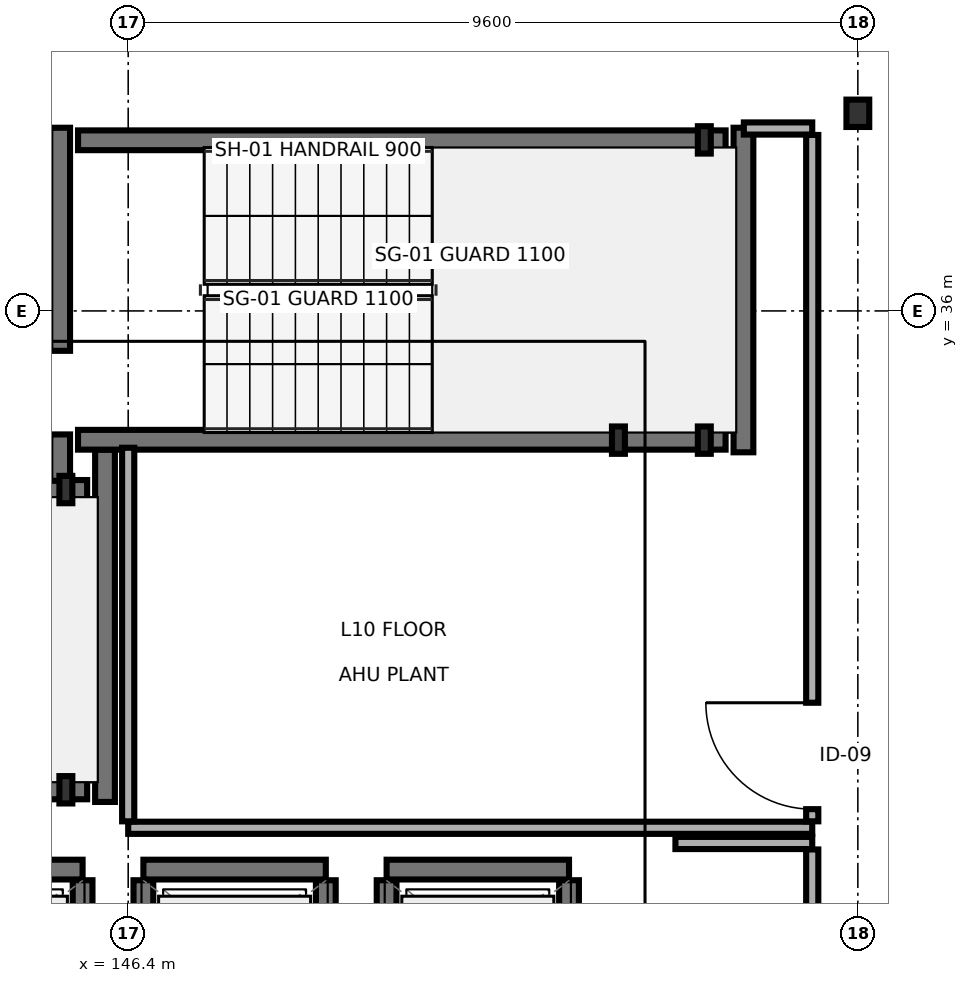
"""IFC4 building model, lengths in metres.
Left out: names, types, materials, properties, quantities, classifications, styles, units other than length and angle.
Written with IfcOpenShell. Run it as: python <this file> out.ifc"""

import sys

from ifc_helpers import new_model, si_unit, direction, frame, frame_2d, origin, origin_2d, place, context, subcontext, project, spatial, rectangle, i_section, extrude, element, fill, save


model = new_model("IFC4")
c1 = context("Model", 3, precision=1e-05, world=origin(), true_north=direction((0.0, 1.0)))
c2 = subcontext(c1, "Body", "Model", "MODEL_VIEW")
j1 = project(units=[si_unit("LENGTHUNIT", "METRE"), si_unit("PLANEANGLEUNIT", "RADIAN")], contexts=[c1])
p1 = place(None, origin())
s1 = spatial("IfcSite", under=j1, at=p1, CompositionType="ELEMENT")
p2 = place(p1, origin())
s2 = spatial("IfcBuilding", under=s1, at=p2, CompositionType="ELEMENT")
p3 = place(p2, frame((0.0, 0.0, 35.1)))
s3 = spatial("IfcBuildingStorey", under=s2, at=p3, CompositionType="ELEMENT", Elevation=35.1)
for number, where, z_axis, x_axis in (
    (1, (145.58, 29.7, 0.0), (0.0, 0.0, 1.0), (1.0, 0.0, 0.0)),
    (2, (145.58, 33.65, 0.0), (0.0, 0.0, 1.0), (1.0, 0.0, 0.0)),
    (3, (152.85, 34.3, 0.0), (0.0, 0.0, 1.0), (1.0, 0.0, 0.0)),
    (4, (153.98, 34.3, 0.0), (0.0, 0.0, 1.0), (1.0, 0.0, 0.0)),
    (5, (153.98, 38.25, 0.0), (0.0, 0.0, 1.0), (1.0, 0.0, 0.0)),
):
    element("IfcColumn", number, at=place(p3, frame(where, z_axis=z_axis, x_axis=x_axis)), inside=s3, PredefinedType="PILASTER", context=c2, shape_type="SweptSolid", body=[
        extrude(i_section(OverallWidth=0.17, OverallDepth=0.36, WebThickness=0.008, FlangeThickness=0.013, FilletRadius=0.018, at=origin_2d()), origin(), (0.0, 0.0, 1.0), 3.4),
    ])
p4 = place(p3, frame((156.0, 38.6, 0.0), z_axis=(0.0, 0.0, 1.0), x_axis=(1.0, 0.0, 0.0)))
e6 = element("IfcColumn", 6, at=p4, inside=s3, PredefinedType="COLUMN", context=c2, shape_type="SweptSolid", body=[
    extrude(i_section(OverallWidth=0.3, OverallDepth=0.36, WebThickness=0.012, FlangeThickness=0.022, FilletRadius=0.027, at=origin_2d()), origin(), (0.0, 0.0, 1.0), 3.4),
])
p5 = place(p3, frame((146.095, 29.54, 0.0), z_axis=(0.0, 0.0, 1.0), x_axis=(0.0, 1.0, 0.0)))
e7 = element("IfcWall", 7, at=p5, inside=s3, PredefinedType="SHEAR", context=c2, shape_type="SweptSolid", body=[
    extrude(rectangle(XDim=4.635, YDim=0.26, at=frame_2d((2.317, 0.0))), origin(), (0.0, 0.0, 1.0), 3.165),
])
for number, where, z_axis, x_axis in (
    (8, (137.34, 29.705, 0.0), (0.0, 0.0, 1.0), (1.0, 0.0, 0.0)),
    (9, (137.34, 33.645, 0.0), (0.0, 0.0, 1.0), (1.0, 0.0, 0.0)),
):
    element("IfcWall", number, at=place(p3, frame(where, z_axis=z_axis, x_axis=x_axis)), inside=s3, PredefinedType="SHEAR", context=c2, shape_type="SweptSolid", body=[
        extrude(rectangle(XDim=8.52, YDim=0.26, at=frame_2d((4.26, 0.0))), origin(), (0.0, 0.0, 1.0), 3.165),
    ])
p6 = place(p3, frame((145.505, 33.765, 0.0), z_axis=(0.0, 0.0, 1.0), x_axis=(0.0, 1.0, 0.0)))
e10 = element("IfcWall", 10, at=p6, inside=s3, PredefinedType="SHEAR", context=c2, shape_type="SweptSolid", body=[
    extrude(rectangle(XDim=4.645, YDim=0.26, at=frame_2d((2.323, 0.0))), origin(), (0.0, 0.0, 1.0), 3.165),
])
p7 = place(p6, frame((0.61, 0.0, 0.0)))
e11 = element("IfcOpeningElement", 11, at=p7, cuts=e10, PredefinedType="OPENING", context=c2, shape_type="SweptSolid", body=[
    extrude(rectangle(XDim=1.1, YDim=2.2, at=frame_2d((0.55, 1.1))), frame((0.0, 0.14, 0.0), z_axis=(0.0, -1.0, 0.0), x_axis=(1.0, 0.0, 0.0)), (0.0, 0.0, 1.0), 0.28),
])
p8 = place(p3, frame((154.495, 34.14, 0.0), z_axis=(0.0, 0.0, 1.0), x_axis=(0.0, 1.0, 0.0)))
e12 = element("IfcWall", 12, at=p8, inside=s3, PredefinedType="SHEAR", context=c2, shape_type="SweptSolid", body=[
    extrude(rectangle(XDim=4.27, YDim=0.26, at=frame_2d((2.135, 0.0))), origin(), (0.0, 0.0, 1.0), 3.165),
])
for number, where, z_axis, x_axis in (
    (13, (145.74, 34.305, 0.0), (0.0, 0.0, 1.0), (1.0, 0.0, 0.0)),
    (14, (145.74, 38.245, 0.0), (0.0, 0.0, 1.0), (1.0, 0.0, 0.0)),
):
    element("IfcWall", number, at=place(p3, frame(where, z_axis=z_axis, x_axis=x_axis)), inside=s3, PredefinedType="SHEAR", context=c2, shape_type="SweptSolid", body=[
        extrude(rectangle(XDim=8.52, YDim=0.26, at=frame_2d((4.26, 0.0))), origin(), (0.0, 0.0, 1.0), 3.165),
    ])
p9 = place(p3, frame((143.4, 28.65, 0.0), z_axis=(0.0, 0.0, 1.0), x_axis=(1.0, 0.0, 0.0)))
e15 = element("IfcWall", 15, at=p9, inside=s3, PredefinedType="SHEAR", context=c2, shape_type="SweptSolid", body=[
    extrude(rectangle(XDim=2.4, YDim=0.26, at=frame_2d((1.2, 0.0))), origin(), (0.0, 0.0, 1.0), 3.165),
])
p10 = place(p3, frame((145.8, 26.69, 0.0), z_axis=(0.0, 0.0, 1.0), x_axis=(0.0, 1.0, 0.0)))
e16 = element("IfcWall", 16, at=p10, inside=s3, PredefinedType="SHEAR", context=c2, shape_type="SweptSolid", body=[
    extrude(rectangle(XDim=1.82, YDim=0.26, at=frame_2d((0.91, 0.0))), origin(), (0.0, 0.0, 1.0), 3.165),
])
p11 = place(p3, frame((146.6, 28.65, 0.0), z_axis=(0.0, 0.0, 1.0), x_axis=(1.0, 0.0, 0.0)))
e17 = element("IfcWall", 17, at=p11, inside=s3, PredefinedType="SHEAR", context=c2, shape_type="SweptSolid", body=[
    extrude(rectangle(XDim=2.4, YDim=0.26, at=frame_2d((1.2, 0.0))), origin(), (0.0, 0.0, 1.0), 3.165),
])
for number, where, z_axis, x_axis in (
    (18, (146.6, 26.69, 0.0), (0.0, 0.0, 1.0), (0.0, 1.0, 0.0)),
    (19, (149.0, 26.69, 0.0), (0.0, 0.0, 1.0), (0.0, 1.0, 0.0)),
):
    element("IfcWall", number, at=place(p3, frame(where, z_axis=z_axis, x_axis=x_axis)), inside=s3, PredefinedType="SHEAR", context=c2, shape_type="SweptSolid", body=[
        extrude(rectangle(XDim=1.82, YDim=0.26, at=frame_2d((0.91, 0.0))), origin(), (0.0, 0.0, 1.0), 3.165),
    ])
p12 = place(p3, frame((149.8, 28.65, 0.0), z_axis=(0.0, 0.0, 1.0), x_axis=(1.0, 0.0, 0.0)))
e20 = element("IfcWall", 20, at=p12, inside=s3, PredefinedType="SHEAR", context=c2, shape_type="SweptSolid", body=[
    extrude(rectangle(XDim=2.4, YDim=0.26, at=frame_2d((1.2, 0.0))), origin(), (0.0, 0.0, 1.0), 3.165),
])
for number, where, z_axis, x_axis in (
    (21, (149.8, 26.69, 0.0), (0.0, 0.0, 1.0), (0.0, 1.0, 0.0)),
    (22, (152.2, 26.69, 0.0), (0.0, 0.0, 1.0), (0.0, 1.0, 0.0)),
):
    element("IfcWall", number, at=place(p3, frame(where, z_axis=z_axis, x_axis=x_axis)), inside=s3, PredefinedType="SHEAR", context=c2, shape_type="SweptSolid", body=[
        extrude(rectangle(XDim=1.82, YDim=0.26, at=frame_2d((0.91, 0.0))), origin(), (0.0, 0.0, 1.0), 3.165),
    ])
p13 = place(p3, frame((146.4, 29.2, 0.0), z_axis=(0.0, 0.0, 1.0), x_axis=(1.0, 0.0, 0.0)))
e23 = element("IfcWall", 23, at=p13, inside=s3, PredefinedType="PARTITIONING", context=c2, shape_type="SweptSolid", body=[
    extrude(rectangle(XDim=9.0, YDim=0.16, at=frame_2d((4.5, 0.0))), origin(), (0.0, 0.0, 1.0), 3.165),
])
p14 = place(p3, frame((146.4, 29.285, 0.0), z_axis=(0.0, 0.0, 1.0), x_axis=(0.0, 1.0, 0.0)))
e24 = element("IfcWall", 24, at=p14, inside=s3, PredefinedType="PARTITIONING", context=c2, shape_type="SweptSolid", body=[
    extrude(rectangle(XDim=4.915, YDim=0.16, at=frame_2d((2.458, 0.0))), origin(), (0.0, 0.0, 1.0), 3.165),
])
p15 = place(p3, frame((154.5, 38.4, 0.0), z_axis=(0.0, 0.0, 1.0), x_axis=(1.0, 0.0, 0.0)))
e25 = element("IfcWall", 25, at=p15, inside=s3, PredefinedType="PARTITIONING", context=c2, shape_type="SweptSolid", body=[
    extrude(rectangle(XDim=0.9, YDim=0.16, at=frame_2d((0.45, 0.0))), origin(), (0.0, 0.0, 1.0), 2.7),
])
p16 = place(p3, frame((155.4, 29.285, 0.0), z_axis=(0.0, 0.0, 1.0), x_axis=(0.0, 1.0, 0.0)))
e26 = element("IfcWall", 26, at=p16, inside=s3, PredefinedType="PARTITIONING", context=c2, shape_type="SweptSolid", body=[
    extrude(rectangle(XDim=9.03, YDim=0.16, at=frame_2d((4.515, 0.0))), origin(), (0.0, 0.0, 1.0), 3.165),
])
p17 = place(p16, frame((0.16, 0.0, 0.0)))
e27 = element("IfcOpeningElement", 27, at=p17, cuts=e26, PredefinedType="OPENING", context=c2, shape_type="SweptSolid", body=[
    extrude(rectangle(XDim=1.4, YDim=2.2, at=frame_2d((0.7, 1.1))), frame((0.0, 0.09, 0.0), z_axis=(0.0, -1.0, 0.0), x_axis=(1.0, 0.0, 0.0)), (0.0, 0.0, 1.0), 0.18),
])
p18 = place(p3, frame((153.6, 29.0, 0.0), z_axis=(0.0, 0.0, 1.0), x_axis=(1.0, 0.0, 0.0)))
e28 = element("IfcWall", 28, at=p18, inside=s3, PredefinedType="PARTITIONING", context=c2, shape_type="SweptSolid", body=[
    extrude(rectangle(XDim=1.8, YDim=0.16, at=frame_2d((0.9, 0.0))), origin(), (0.0, 0.0, 1.0), 3.165),
])
p19 = place(p3, frame((155.4, 16.885, 0.0), z_axis=(0.0, 0.0, 1.0), x_axis=(0.0, 1.0, 0.0)))
e29 = element("IfcWall", 29, at=p19, inside=s3, PredefinedType="PARTITIONING", context=c2, shape_type="SweptSolid", body=[
    extrude(rectangle(XDim=12.03, YDim=0.16, at=frame_2d((6.015, 0.0))), origin(), (0.0, 0.0, 1.0), 2.7),
])
p20 = place(p19, frame((5.365, 0.0, 0.0)))
e30 = element("IfcOpeningElement", 30, at=p20, cuts=e29, PredefinedType="OPENING", context=c2, shape_type="SweptSolid", body=[
    extrude(rectangle(XDim=1.3, YDim=2.2, at=frame_2d((0.65, 1.1))), frame((0.0, 0.09, 0.0), z_axis=(0.0, -1.0, 0.0), x_axis=(1.0, 0.0, 0.0)), (0.0, 0.0, 1.0), 0.18),
])
p21 = place(p7, origin())
e31 = element("IfcDoor", 31, at=p21, inside=s3, OperationType="SINGLE_SWING_LEFT", PredefinedType="DOOR", context=c2, shape_type="SweptSolid", body=[
    extrude(rectangle(XDim=1.1, YDim=2.2, at=frame_2d((0.55, 1.1))), frame((0.0, 0.025, 0.0), z_axis=(0.0, -1.0, 0.0), x_axis=(1.0, 0.0, 0.0)), (0.0, 0.0, 1.0), 0.05),
])
fill(e11, e31)
p22 = place(p17, origin())
e32 = element("IfcDoor", 32, at=p22, inside=s3, OperationType="SINGLE_SWING_RIGHT", PredefinedType="DOOR", context=c2, shape_type="SweptSolid", body=[
    extrude(rectangle(XDim=1.4, YDim=2.2, at=frame_2d((0.7, 1.1))), frame((0.0, 0.025, 0.0), z_axis=(0.0, -1.0, 0.0), x_axis=(1.0, 0.0, 0.0)), (0.0, 0.0, 1.0), 0.05),
])
fill(e27, e32)
save(model, sys.argv[1])
